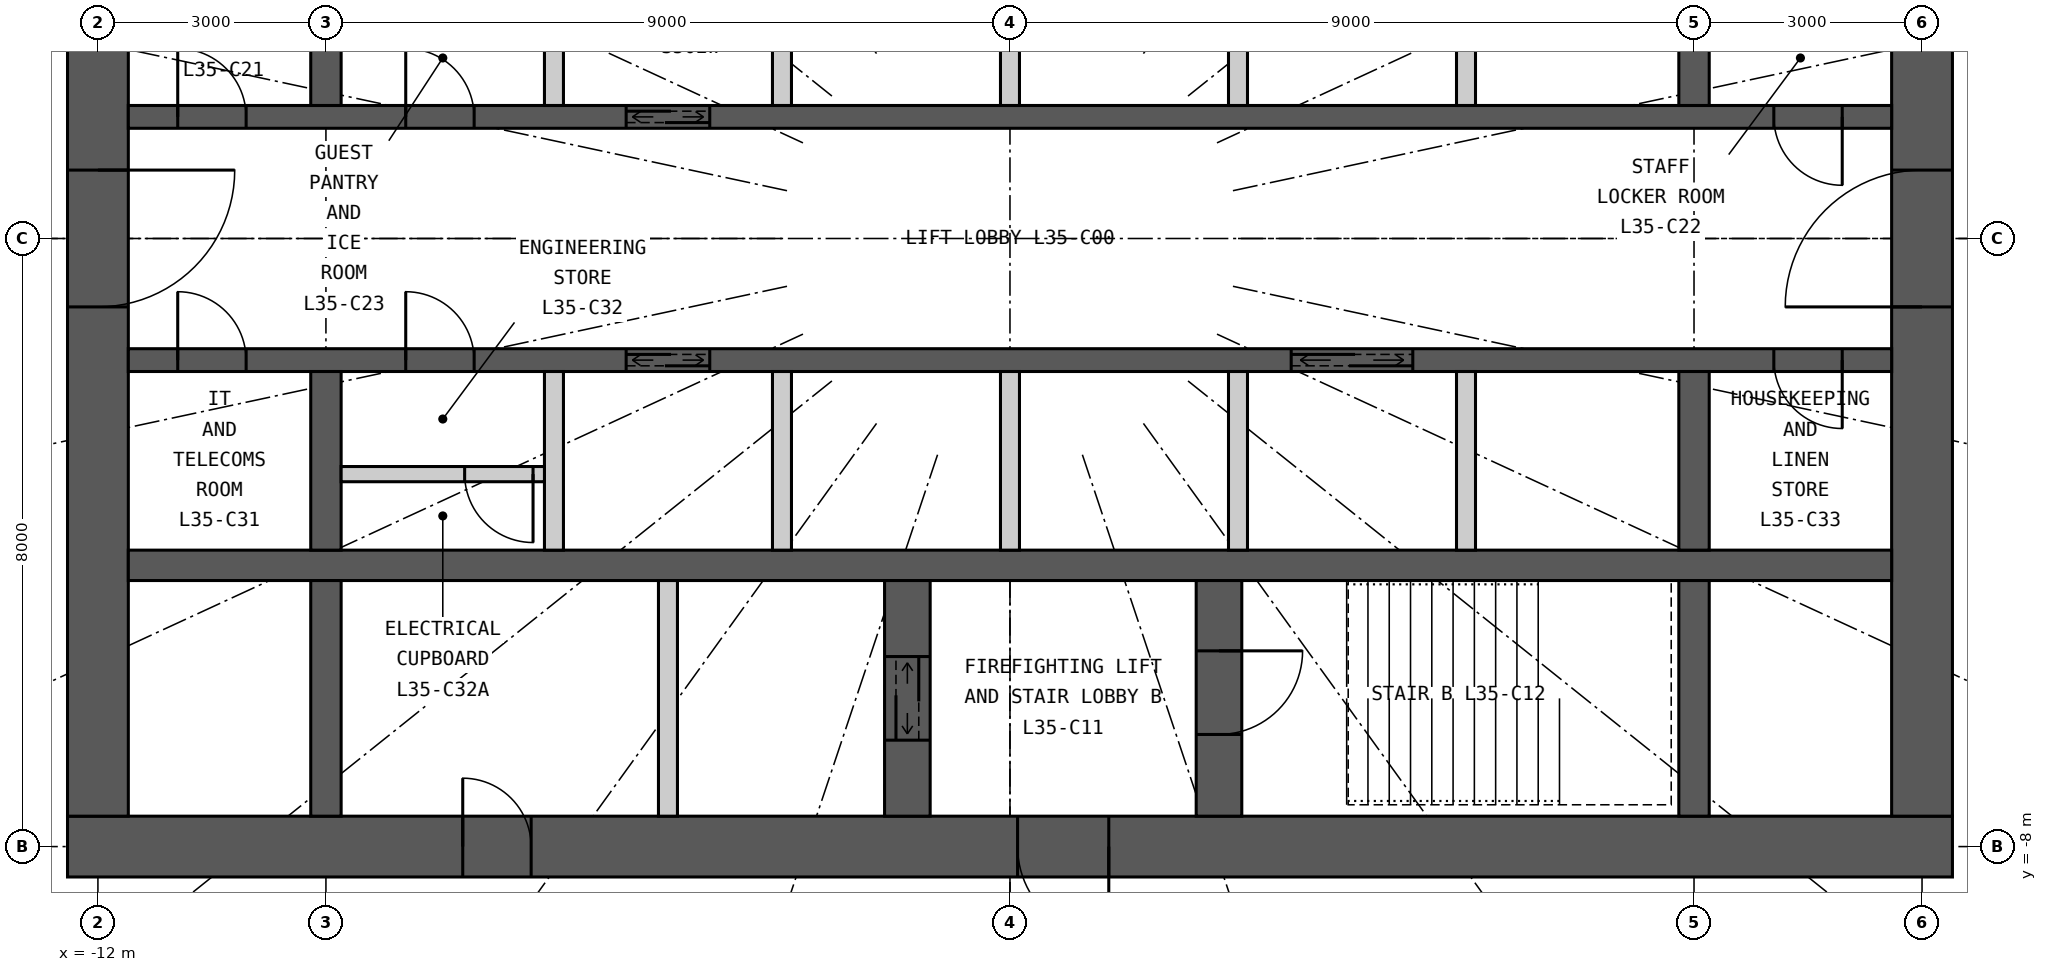
"""IFC4 building model, lengths in metres.
Left out: names, types, materials, properties, quantities, classifications, styles, units other than length and angle.
Written with IfcOpenShell. Run it as: python <this file> out.ifc"""

import sys

from ifc_helpers import new_model, si_unit, direction, frame, frame_2d, origin, place, context, subcontext, project, spatial, rectangle, extrude, element, fill, save


model = new_model("IFC4")
c1 = context("Model", 3, precision=1e-05, world=origin(), true_north=direction((0.0, 1.0)))
c2 = subcontext(c1, "Body", "Model", "MODEL_VIEW")
j1 = project(units=[si_unit("LENGTHUNIT", "METRE"), si_unit("PLANEANGLEUNIT", "RADIAN")], contexts=[c1])
p1 = place(None, origin())
s1 = spatial("IfcSite", under=j1, at=p1, CompositionType="ELEMENT")
p2 = place(p1, origin())
s2 = spatial("IfcBuilding", under=s1, at=p2, CompositionType="ELEMENT")
p3 = place(p2, frame((0.0, 0.0, 135.3)))
s3 = spatial("IfcBuildingStorey", under=s2, at=p3, CompositionType="ELEMENT", Elevation=135.3)
p4 = place(p3, frame((12.4, -8.0, 0.0), z_axis=(0.0, 0.0, 1.0), x_axis=(-1.0, 0.0, 0.0)))
e1 = element("IfcWall", 1, at=p4, inside=s3, PredefinedType="SHEAR", context=c2, shape_type="SweptSolid", body=[
    extrude(rectangle(XDim=24.8, YDim=0.8, at=frame_2d((12.4, 0.0))), origin(), (0.0, 0.0, 1.0), 3.3),
])
p5 = place(p4, frame((11.1, 0.0, 0.0)))
e2 = element("IfcOpeningElement", 2, at=p5, cuts=e1, PredefinedType="OPENING", context=c2, shape_type="SweptSolid", body=[
    extrude(rectangle(XDim=1.2, YDim=2.2, at=frame_2d((0.6, 1.1))), frame((0.0, 0.41, 0.0), z_axis=(0.0, -1.0, 0.0), x_axis=(1.0, 0.0, 0.0)), (0.0, 0.0, 1.0), 0.82),
])
p6 = place(p4, frame((18.7, 0.0, 0.0)))
e3 = element("IfcOpeningElement", 3, at=p6, cuts=e1, PredefinedType="OPENING", context=c2, shape_type="SweptSolid", body=[
    extrude(rectangle(XDim=0.9, YDim=2.2, at=frame_2d((0.45, 1.1))), frame((0.0, 0.41, 0.0), z_axis=(0.0, -1.0, 0.0), x_axis=(1.0, 0.0, 0.0)), (0.0, 0.0, 1.0), 0.82),
])
p7 = place(p3, frame((12.0, -7.6, 0.0), z_axis=(0.0, 0.0, 1.0), x_axis=(0.0, 1.0, 0.0)))
e4 = element("IfcWall", 4, at=p7, inside=s3, PredefinedType="SHEAR", context=c2, shape_type="SweptSolid", body=[
    extrude(rectangle(XDim=15.2, YDim=0.8, at=frame_2d((7.6, 0.0))), origin(), (0.0, 0.0, 1.0), 3.3),
])
p8 = place(p7, frame((6.7, 0.0, 0.0)))
e5 = element("IfcOpeningElement", 5, at=p8, cuts=e4, PredefinedType="OPENING", context=c2, shape_type="SweptSolid", body=[
    extrude(rectangle(XDim=1.8, YDim=2.2, at=frame_2d((0.9, 1.1))), frame((0.0, 0.41, 0.0), z_axis=(0.0, -1.0, 0.0), x_axis=(1.0, 0.0, 0.0)), (0.0, 0.0, 1.0), 0.82),
])
p9 = place(p3, frame((-12.0, 7.6, 0.0), z_axis=(0.0, 0.0, 1.0), x_axis=(0.0, -1.0, 0.0)))
e6 = element("IfcWall", 6, at=p9, inside=s3, PredefinedType="SHEAR", context=c2, shape_type="SweptSolid", body=[
    extrude(rectangle(XDim=15.2, YDim=0.8, at=frame_2d((7.6, 0.0))), origin(), (0.0, 0.0, 1.0), 3.3),
])
p10 = place(p9, frame((6.7, 0.0, 0.0)))
e7 = element("IfcOpeningElement", 7, at=p10, cuts=e6, PredefinedType="OPENING", context=c2, shape_type="SweptSolid", body=[
    extrude(rectangle(XDim=1.8, YDim=2.2, at=frame_2d((0.9, 1.1))), frame((0.0, 0.41, 0.0), z_axis=(0.0, -1.0, 0.0), x_axis=(1.0, 0.0, 0.0)), (0.0, 0.0, 1.0), 0.82),
])
p11 = place(p3, frame((-11.6, 1.6, 0.0), z_axis=(0.0, 0.0, 1.0), x_axis=(1.0, 0.0, 0.0)))
e8 = element("IfcWall", 8, at=p11, inside=s3, PredefinedType="SHEAR", context=c2, shape_type="SweptSolid", body=[
    extrude(rectangle(XDim=23.2, YDim=0.3, at=frame_2d((11.6, 0.0))), origin(), (0.0, 0.0, 1.0), 3.3),
])
p12 = place(p11, frame((6.55, 0.0, 0.0)))
e9 = element("IfcOpeningElement", 9, at=p12, cuts=e8, PredefinedType="OPENING", context=c2, shape_type="SweptSolid", body=[
    extrude(rectangle(XDim=1.1, YDim=2.2, at=frame_2d((0.55, 1.1))), frame((0.0, 0.16, 0.0), z_axis=(0.0, -1.0, 0.0), x_axis=(1.0, 0.0, 0.0)), (0.0, 0.0, 1.0), 0.32),
])
p13 = place(p11, frame((0.65, 0.0, 0.0)))
e10 = element("IfcOpeningElement", 10, at=p13, cuts=e8, PredefinedType="OPENING", context=c2, shape_type="SweptSolid", body=[
    extrude(rectangle(XDim=0.9, YDim=2.2, at=frame_2d((0.45, 1.1))), frame((0.0, 0.16, 0.0), z_axis=(0.0, -1.0, 0.0), x_axis=(1.0, 0.0, 0.0)), (0.0, 0.0, 1.0), 0.32),
])
p14 = place(p11, frame((21.65, 0.0, 0.0)))
e11 = element("IfcOpeningElement", 11, at=p14, cuts=e8, PredefinedType="OPENING", context=c2, shape_type="SweptSolid", body=[
    extrude(rectangle(XDim=0.9, YDim=2.2, at=frame_2d((0.45, 1.1))), frame((0.0, 0.16, 0.0), z_axis=(0.0, -1.0, 0.0), x_axis=(1.0, 0.0, 0.0)), (0.0, 0.0, 1.0), 0.32),
])
p15 = place(p11, frame((3.65, 0.0, 0.0)))
e12 = element("IfcOpeningElement", 12, at=p15, cuts=e8, PredefinedType="OPENING", context=c2, shape_type="SweptSolid", body=[
    extrude(rectangle(XDim=0.9, YDim=2.2, at=frame_2d((0.45, 1.1))), frame((0.0, 0.16, 0.0), z_axis=(0.0, -1.0, 0.0), x_axis=(1.0, 0.0, 0.0)), (0.0, 0.0, 1.0), 0.32),
])
p16 = place(p3, frame((-11.6, -4.3, 0.0), z_axis=(0.0, 0.0, 1.0), x_axis=(1.0, 0.0, 0.0)))
e13 = element("IfcWall", 13, at=p16, inside=s3, PredefinedType="SHEAR", context=c2, shape_type="SweptSolid", body=[
    extrude(rectangle(XDim=23.2, YDim=0.4, at=frame_2d((11.6, 0.0))), origin(), (0.0, 0.0, 1.0), 3.3),
])
p17 = place(p3, frame((-11.6, -1.6, 0.0), z_axis=(0.0, 0.0, 1.0), x_axis=(1.0, 0.0, 0.0)))
e14 = element("IfcWall", 14, at=p17, inside=s3, PredefinedType="SHEAR", context=c2, shape_type="SweptSolid", body=[
    extrude(rectangle(XDim=23.2, YDim=0.3, at=frame_2d((11.6, 0.0))), origin(), (0.0, 0.0, 1.0), 3.3),
])
p18 = place(p17, frame((6.55, 0.0, 0.0)))
e15 = element("IfcOpeningElement", 15, at=p18, cuts=e14, PredefinedType="OPENING", context=c2, shape_type="SweptSolid", body=[
    extrude(rectangle(XDim=1.1, YDim=2.2, at=frame_2d((0.55, 1.1))), frame((0.0, 0.16, 0.0), z_axis=(0.0, -1.0, 0.0), x_axis=(1.0, 0.0, 0.0)), (0.0, 0.0, 1.0), 0.32),
])
p19 = place(p17, frame((15.3, 0.0, 0.0)))
e16 = element("IfcOpeningElement", 16, at=p19, cuts=e14, PredefinedType="OPENING", context=c2, shape_type="SweptSolid", body=[
    extrude(rectangle(XDim=1.6, YDim=2.4, at=frame_2d((0.8, 1.2))), frame((0.0, 0.16, 0.0), z_axis=(0.0, -1.0, 0.0), x_axis=(1.0, 0.0, 0.0)), (0.0, 0.0, 1.0), 0.32),
])
p20 = place(p17, frame((0.65, 0.0, 0.0)))
e17 = element("IfcOpeningElement", 17, at=p20, cuts=e14, PredefinedType="OPENING", context=c2, shape_type="SweptSolid", body=[
    extrude(rectangle(XDim=0.9, YDim=2.2, at=frame_2d((0.45, 1.1))), frame((0.0, 0.16, 0.0), z_axis=(0.0, -1.0, 0.0), x_axis=(1.0, 0.0, 0.0)), (0.0, 0.0, 1.0), 0.32),
])
p21 = place(p17, frame((3.65, 0.0, 0.0)))
e18 = element("IfcOpeningElement", 18, at=p21, cuts=e14, PredefinedType="OPENING", context=c2, shape_type="SweptSolid", body=[
    extrude(rectangle(XDim=0.9, YDim=2.2, at=frame_2d((0.45, 1.1))), frame((0.0, 0.16, 0.0), z_axis=(0.0, -1.0, 0.0), x_axis=(1.0, 0.0, 0.0)), (0.0, 0.0, 1.0), 0.32),
])
p22 = place(p17, frame((21.65, 0.0, 0.0)))
e19 = element("IfcOpeningElement", 19, at=p22, cuts=e14, PredefinedType="OPENING", context=c2, shape_type="SweptSolid", body=[
    extrude(rectangle(XDim=0.9, YDim=2.2, at=frame_2d((0.45, 1.1))), frame((0.0, 0.16, 0.0), z_axis=(0.0, -1.0, 0.0), x_axis=(1.0, 0.0, 0.0)), (0.0, 0.0, 1.0), 0.32),
])
for number, where, z_axis, x_axis in (
    (20, (-9.0, 1.75, 0.0), (0.0, 0.0, 1.0), (0.0, 1.0, 0.0)),
    (21, (-9.0, -4.1, 0.0), (0.0, 0.0, 1.0), (0.0, 1.0, 0.0)),
):
    element("IfcWall", number, at=place(p3, frame(where, z_axis=z_axis, x_axis=x_axis)), inside=s3, PredefinedType="SHEAR", context=c2, shape_type="SweptSolid", body=[
        extrude(rectangle(XDim=2.35, YDim=0.4, at=frame_2d((1.175, 0.0))), origin(), (0.0, 0.0, 1.0), 3.3),
    ])
p23 = place(p3, frame((-9.0, -7.6, 0.0), z_axis=(0.0, 0.0, 1.0), x_axis=(0.0, 1.0, 0.0)))
e22 = element("IfcWall", 22, at=p23, inside=s3, PredefinedType="SHEAR", context=c2, shape_type="SweptSolid", body=[
    extrude(rectangle(XDim=3.1, YDim=0.4, at=frame_2d((1.55, 0.0))), origin(), (0.0, 0.0, 1.0), 3.3),
])
for number, where, z_axis, x_axis in (
    (23, (9.0, 1.75, 0.0), (0.0, 0.0, 1.0), (0.0, 1.0, 0.0)),
    (24, (9.0, -4.1, 0.0), (0.0, 0.0, 1.0), (0.0, 1.0, 0.0)),
):
    element("IfcWall", number, at=place(p3, frame(where, z_axis=z_axis, x_axis=x_axis)), inside=s3, PredefinedType="SHEAR", context=c2, shape_type="SweptSolid", body=[
        extrude(rectangle(XDim=2.35, YDim=0.4, at=frame_2d((1.175, 0.0))), origin(), (0.0, 0.0, 1.0), 3.3),
    ])
p24 = place(p3, frame((9.0, -7.6, 0.0), z_axis=(0.0, 0.0, 1.0), x_axis=(0.0, 1.0, 0.0)))
e25 = element("IfcWall", 25, at=p24, inside=s3, PredefinedType="SHEAR", context=c2, shape_type="SweptSolid", body=[
    extrude(rectangle(XDim=3.1, YDim=0.4, at=frame_2d((1.55, 0.0))), origin(), (0.0, 0.0, 1.0), 3.3),
])
p25 = place(p3, frame((2.75, -7.6, 0.0), z_axis=(0.0, 0.0, 1.0), x_axis=(0.0, 1.0, 0.0)))
e26 = element("IfcWall", 26, at=p25, inside=s3, PredefinedType="SHEAR", context=c2, shape_type="SweptSolid", body=[
    extrude(rectangle(XDim=3.1, YDim=0.6, at=frame_2d((1.55, 0.0))), origin(), (0.0, 0.0, 1.0), 3.3),
])
p26 = place(p25, frame((1.075, 0.0, 0.0)))
e27 = element("IfcOpeningElement", 27, at=p26, cuts=e26, PredefinedType="OPENING", context=c2, shape_type="SweptSolid", body=[
    extrude(rectangle(XDim=1.1, YDim=2.2, at=frame_2d((0.55, 1.1))), frame((0.0, 0.31, 0.0), z_axis=(0.0, -1.0, 0.0), x_axis=(1.0, 0.0, 0.0)), (0.0, 0.0, 1.0), 0.62),
])
p27 = place(p3, frame((-1.35, -7.6, 0.0), z_axis=(0.0, 0.0, 1.0), x_axis=(0.0, 1.0, 0.0)))
e28 = element("IfcWall", 28, at=p27, inside=s3, PredefinedType="SHEAR", context=c2, shape_type="SweptSolid", body=[
    extrude(rectangle(XDim=3.1, YDim=0.6, at=frame_2d((1.55, 0.0))), origin(), (0.0, 0.0, 1.0), 3.3),
])
p28 = place(p27, frame((1.0, 0.0, 0.0)))
e29 = element("IfcOpeningElement", 29, at=p28, cuts=e28, PredefinedType="OPENING", context=c2, shape_type="SweptSolid", body=[
    extrude(rectangle(XDim=1.1, YDim=2.2, at=frame_2d((0.55, 1.1))), frame((0.0, 0.31, 0.0), z_axis=(0.0, -1.0, 0.0), x_axis=(1.0, 0.0, 0.0)), (0.0, 0.0, 1.0), 0.62),
])
p29 = place(p3, frame((-4.5, -7.6, 0.0), z_axis=(0.0, 0.0, 1.0), x_axis=(0.0, 1.0, 0.0)))
e30 = element("IfcWall", 30, at=p29, inside=s3, PredefinedType="PARTITIONING", context=c2, shape_type="SweptSolid", body=[
    extrude(rectangle(XDim=3.1, YDim=0.25, at=frame_2d((1.55, 0.0))), origin(), (0.0, 0.0, 1.0), 3.3),
])
for number, where, z_axis, x_axis in (
    (31, (-6.0, 1.75, 0.0), (0.0, 0.0, 1.0), (0.0, 1.0, 0.0)),
    (32, (-3.0, 1.75, 0.0), (0.0, 0.0, 1.0), (0.0, 1.0, 0.0)),
    (33, (0.0, 1.75, 0.0), (0.0, 0.0, 1.0), (0.0, 1.0, 0.0)),
    (34, (3.0, 1.75, 0.0), (0.0, 0.0, 1.0), (0.0, 1.0, 0.0)),
    (35, (6.0, 1.75, 0.0), (0.0, 0.0, 1.0), (0.0, 1.0, 0.0)),
    (36, (-6.0, -4.1, 0.0), (0.0, 0.0, 1.0), (0.0, 1.0, 0.0)),
    (37, (-3.0, -4.1, 0.0), (0.0, 0.0, 1.0), (0.0, 1.0, 0.0)),
    (38, (0.0, -4.1, 0.0), (0.0, 0.0, 1.0), (0.0, 1.0, 0.0)),
    (39, (3.0, -4.1, 0.0), (0.0, 0.0, 1.0), (0.0, 1.0, 0.0)),
    (40, (6.0, -4.1, 0.0), (0.0, 0.0, 1.0), (0.0, 1.0, 0.0)),
):
    element("IfcWall", number, at=place(p3, frame(where, z_axis=z_axis, x_axis=x_axis)), inside=s3, PredefinedType="PARTITIONING", context=c2, shape_type="SweptSolid", body=[
        extrude(rectangle(XDim=2.35, YDim=0.25, at=frame_2d((1.175, 0.0))), origin(), (0.0, 0.0, 1.0), 3.3),
    ])
p30 = place(p3, frame((-8.8, -3.1, 0.0), z_axis=(0.0, 0.0, 1.0), x_axis=(1.0, 0.0, 0.0)))
e41 = element("IfcWall", 41, at=p30, inside=s3, PredefinedType="PARTITIONING", context=c2, shape_type="SweptSolid", body=[
    extrude(rectangle(XDim=2.675, YDim=0.2, at=frame_2d((1.337, 0.0))), origin(), (0.0, 0.0, 1.0), 3.05),
])
p31 = place(p30, frame((1.625, 0.0, 0.0)))
e42 = element("IfcOpeningElement", 42, at=p31, cuts=e41, PredefinedType="OPENING", context=c2, shape_type="SweptSolid", body=[
    extrude(rectangle(XDim=0.9, YDim=2.2, at=frame_2d((0.45, 1.1))), frame((0.0, 0.11, 0.0), z_axis=(0.0, -1.0, 0.0), x_axis=(1.0, 0.0, 0.0)), (0.0, 0.0, 1.0), 0.22),
])
p32 = place(p5, origin())
e43 = element("IfcDoor", 43, at=p32, inside=s3, OperationType="SINGLE_SWING_LEFT", PredefinedType="DOOR", context=c2, shape_type="SweptSolid", body=[
    extrude(rectangle(XDim=1.2, YDim=2.2, at=frame_2d((0.6, 1.1))), frame((0.0, 0.025, 0.0), z_axis=(0.0, -1.0, 0.0), x_axis=(1.0, 0.0, 0.0)), (0.0, 0.0, 1.0), 0.05),
])
fill(e2, e43)
p33 = place(p26, origin())
e44 = element("IfcDoor", 44, at=p33, inside=s3, OperationType="SINGLE_SWING_RIGHT", PredefinedType="DOOR", context=c2, shape_type="SweptSolid", body=[
    extrude(rectangle(XDim=1.1, YDim=2.2, at=frame_2d((0.55, 1.1))), frame((0.0, 0.025, 0.0), z_axis=(0.0, -1.0, 0.0), x_axis=(1.0, 0.0, 0.0)), (0.0, 0.0, 1.0), 0.05),
])
fill(e27, e44)
p34 = place(p28, origin())
e45 = element("IfcDoor", 45, at=p34, inside=s3, OperationType="DOUBLE_DOOR_SLIDING", PredefinedType="DOOR", context=c2, shape_type="SweptSolid", body=[
    extrude(rectangle(XDim=1.1, YDim=2.2, at=frame_2d((0.55, 1.1))), frame((0.0, 0.025, 0.0), z_axis=(0.0, -1.0, 0.0), x_axis=(1.0, 0.0, 0.0)), (0.0, 0.0, 1.0), 0.05),
])
fill(e29, e45)
p35 = place(p6, origin())
e46 = element("IfcDoor", 46, at=p35, inside=s3, OperationType="SINGLE_SWING_RIGHT", PredefinedType="DOOR", context=c2, shape_type="SweptSolid", body=[
    extrude(rectangle(XDim=0.9, YDim=2.2, at=frame_2d((0.45, 1.1))), frame((0.0, 0.025, 0.0), z_axis=(0.0, -1.0, 0.0), x_axis=(1.0, 0.0, 0.0)), (0.0, 0.0, 1.0), 0.05),
])
fill(e3, e46)
p36 = place(p12, origin())
e47 = element("IfcDoor", 47, at=p36, inside=s3, OperationType="DOUBLE_DOOR_SLIDING", PredefinedType="DOOR", context=c2, shape_type="SweptSolid", body=[
    extrude(rectangle(XDim=1.1, YDim=2.2, at=frame_2d((0.55, 1.1))), frame((0.0, 0.025, 0.0), z_axis=(0.0, -1.0, 0.0), x_axis=(1.0, 0.0, 0.0)), (0.0, 0.0, 1.0), 0.05),
])
fill(e9, e47)
p37 = place(p18, origin())
e48 = element("IfcDoor", 48, at=p37, inside=s3, OperationType="DOUBLE_DOOR_SLIDING", PredefinedType="DOOR", context=c2, shape_type="SweptSolid", body=[
    extrude(rectangle(XDim=1.1, YDim=2.2, at=frame_2d((0.55, 1.1))), frame((0.0, 0.025, 0.0), z_axis=(0.0, -1.0, 0.0), x_axis=(1.0, 0.0, 0.0)), (0.0, 0.0, 1.0), 0.05),
])
fill(e15, e48)
p38 = place(p19, origin())
e49 = element("IfcDoor", 49, at=p38, inside=s3, OperationType="DOUBLE_DOOR_SLIDING", PredefinedType="DOOR", context=c2, shape_type="SweptSolid", body=[
    extrude(rectangle(XDim=1.6, YDim=2.4, at=frame_2d((0.8, 1.2))), frame((0.0, 0.025, 0.0), z_axis=(0.0, -1.0, 0.0), x_axis=(1.0, 0.0, 0.0)), (0.0, 0.0, 1.0), 0.05),
])
fill(e16, e49)
p39 = place(p13, origin())
e50 = element("IfcDoor", 50, at=p39, inside=s3, OperationType="SINGLE_SWING_LEFT", PredefinedType="DOOR", context=c2, shape_type="SweptSolid", body=[
    extrude(rectangle(XDim=0.9, YDim=2.2, at=frame_2d((0.45, 1.1))), frame((0.0, 0.025, 0.0), z_axis=(0.0, -1.0, 0.0), x_axis=(1.0, 0.0, 0.0)), (0.0, 0.0, 1.0), 0.05),
])
fill(e10, e50)
p40 = place(p14, origin())
e51 = element("IfcDoor", 51, at=p40, inside=s3, OperationType="SINGLE_SWING_RIGHT", PredefinedType="DOOR", context=c2, shape_type="SweptSolid", body=[
    extrude(rectangle(XDim=0.9, YDim=2.2, at=frame_2d((0.45, 1.1))), frame((0.0, 0.025, 0.0), z_axis=(0.0, -1.0, 0.0), x_axis=(1.0, 0.0, 0.0)), (0.0, 0.0, 1.0), 0.05),
])
fill(e11, e51)
p41 = place(p20, origin())
e52 = element("IfcDoor", 52, at=p41, inside=s3, OperationType="SINGLE_SWING_LEFT", PredefinedType="DOOR", context=c2, shape_type="SweptSolid", body=[
    extrude(rectangle(XDim=0.9, YDim=2.2, at=frame_2d((0.45, 1.1))), frame((0.0, 0.025, 0.0), z_axis=(0.0, -1.0, 0.0), x_axis=(1.0, 0.0, 0.0)), (0.0, 0.0, 1.0), 0.05),
])
fill(e17, e52)
p42 = place(p31, origin())
e53 = element("IfcDoor", 53, at=p42, inside=s3, OperationType="SINGLE_SWING_RIGHT", PredefinedType="DOOR", context=c2, shape_type="SweptSolid", body=[
    extrude(rectangle(XDim=0.9, YDim=2.2, at=frame_2d((0.45, 1.1))), frame((0.0, 0.025, 0.0), z_axis=(0.0, -1.0, 0.0), x_axis=(1.0, 0.0, 0.0)), (0.0, 0.0, 1.0), 0.05),
])
fill(e42, e53)
p43 = place(p21, origin())
e54 = element("IfcDoor", 54, at=p43, inside=s3, OperationType="SINGLE_SWING_LEFT", PredefinedType="DOOR", context=c2, shape_type="SweptSolid", body=[
    extrude(rectangle(XDim=0.9, YDim=2.2, at=frame_2d((0.45, 1.1))), frame((0.0, 0.025, 0.0), z_axis=(0.0, -1.0, 0.0), x_axis=(1.0, 0.0, 0.0)), (0.0, 0.0, 1.0), 0.05),
])
fill(e18, e54)
p44 = place(p22, origin())
e55 = element("IfcDoor", 55, at=p44, inside=s3, OperationType="SINGLE_SWING_RIGHT", PredefinedType="DOOR", context=c2, shape_type="SweptSolid", body=[
    extrude(rectangle(XDim=0.9, YDim=2.2, at=frame_2d((0.45, 1.1))), frame((0.0, 0.025, 0.0), z_axis=(0.0, -1.0, 0.0), x_axis=(1.0, 0.0, 0.0)), (0.0, 0.0, 1.0), 0.05),
])
fill(e19, e55)
p45 = place(p15, origin())
e56 = element("IfcDoor", 56, at=p45, inside=s3, OperationType="SINGLE_SWING_LEFT", PredefinedType="DOOR", context=c2, shape_type="SweptSolid", body=[
    extrude(rectangle(XDim=0.9, YDim=2.2, at=frame_2d((0.45, 1.1))), frame((0.0, 0.025, 0.0), z_axis=(0.0, -1.0, 0.0), x_axis=(1.0, 0.0, 0.0)), (0.0, 0.0, 1.0), 0.05),
])
fill(e12, e56)
p46 = place(p8, origin())
e57 = element("IfcDoor", 57, at=p46, inside=s3, OperationType="DOUBLE_DOOR_DOUBLE_SWING", PredefinedType="DOOR", context=c2, shape_type="SweptSolid", body=[
    extrude(rectangle(XDim=1.8, YDim=2.2, at=frame_2d((0.9, 1.1))), frame((0.0, 0.025, 0.0), z_axis=(0.0, -1.0, 0.0), x_axis=(1.0, 0.0, 0.0)), (0.0, 0.0, 1.0), 0.05),
])
fill(e5, e57)
p47 = place(p10, origin())
e58 = element("IfcDoor", 58, at=p47, inside=s3, OperationType="DOUBLE_DOOR_DOUBLE_SWING", PredefinedType="DOOR", context=c2, shape_type="SweptSolid", body=[
    extrude(rectangle(XDim=1.8, YDim=2.2, at=frame_2d((0.9, 1.1))), frame((0.0, 0.025, 0.0), z_axis=(0.0, -1.0, 0.0), x_axis=(1.0, 0.0, 0.0)), (0.0, 0.0, 1.0), 0.05),
])
fill(e7, e58)
save(model, sys.argv[1])
